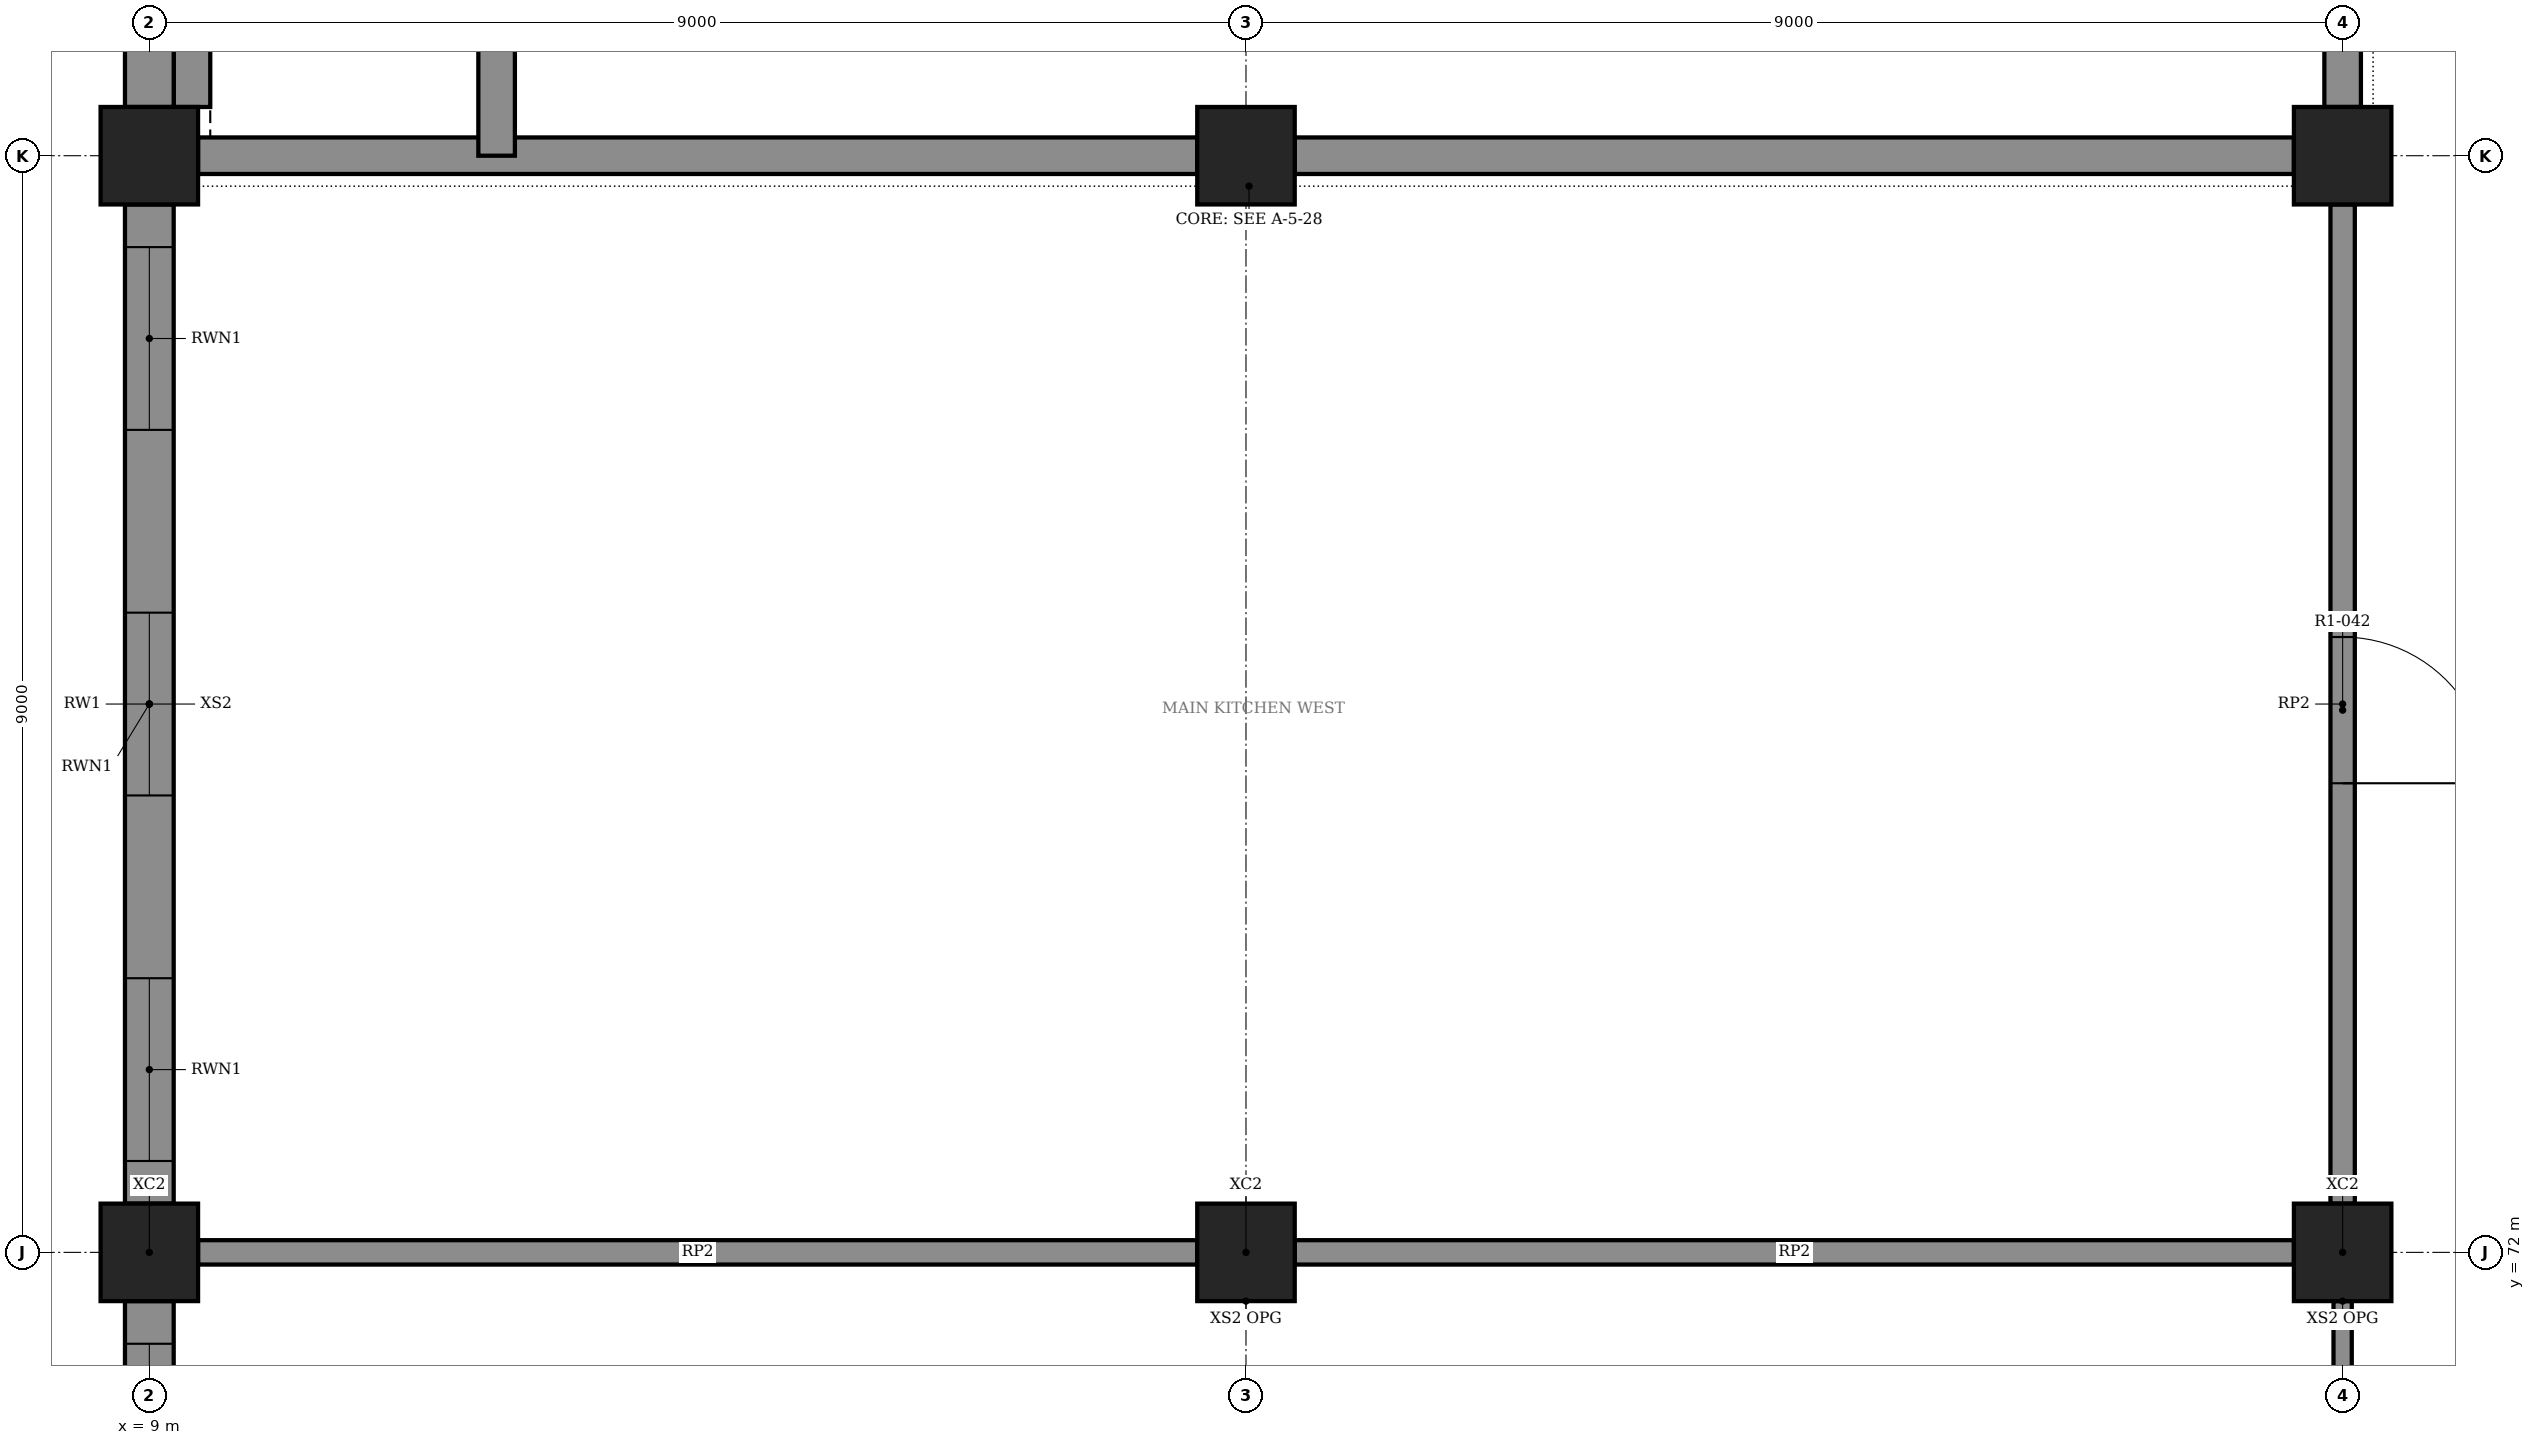
"""IFC4 building model, lengths in metres.
Left out: names, types, materials, properties, quantities, classifications, styles, units other than length and angle.
Written with IfcOpenShell. Run it as: python <this file> out.ifc"""

import sys

from ifc_helpers import new_model, si_unit, direction, frame, frame_2d, origin, origin_2d, place, context, subcontext, project, spatial, rectangle, extrude, element, fill, save


model = new_model("IFC4")
c1 = context("Model", 3, precision=1e-05, world=origin(), true_north=direction((0.0, 1.0)))
c2 = subcontext(c1, "Body", "Model", "MODEL_VIEW")
j1 = project(units=[si_unit("LENGTHUNIT", "METRE"), si_unit("PLANEANGLEUNIT", "RADIAN")], contexts=[c1])
p1 = place(None, origin())
s1 = spatial("IfcSite", under=j1, at=p1, CompositionType="ELEMENT")
p2 = place(p1, origin())
s2 = spatial("IfcBuilding", under=s1, at=p2, CompositionType="ELEMENT")
p3 = place(p2, frame((0.0, 0.0, 6.0)))
s3 = spatial("IfcBuildingStorey", under=s2, at=p3, CompositionType="ELEMENT", Elevation=6.0)
for number, where, z_axis, x_axis in (
    (1, (9.0, 72.0, 0.0), (0.0, 0.0, 1.0), (1.0, 0.0, 0.0)),
    (2, (9.0, 81.0, 0.0), (0.0, 0.0, 1.0), (1.0, 0.0, 0.0)),
    (3, (18.0, 72.0, 0.0), (0.0, 0.0, 1.0), (1.0, 0.0, 0.0)),
    (4, (18.0, 81.0, 0.0), (0.0, 0.0, 1.0), (1.0, 0.0, 0.0)),
    (5, (27.0, 72.0, 0.0), (0.0, 0.0, 1.0), (1.0, 0.0, 0.0)),
    (6, (27.0, 81.0, 0.0), (0.0, 0.0, 1.0), (1.0, 0.0, 0.0)),
):
    element("IfcColumn", number, at=place(p3, frame(where, z_axis=z_axis, x_axis=x_axis)), inside=s3, PredefinedType="COLUMN", context=c2, shape_type="SweptSolid", body=[
        extrude(rectangle(XDim=0.8, YDim=0.8, at=origin_2d()), origin(), (0.0, 0.0, 1.0), 5.5),
    ])
p4 = place(p3, frame((9.0, 63.4, 0.0), z_axis=(0.0, 0.0, 1.0), x_axis=(0.0, 1.0, 0.0)))
e7 = element("IfcWall", 7, at=p4, inside=s3, PredefinedType="SOLIDWALL", context=c2, shape_type="SweptSolid", body=[
    extrude(rectangle(XDim=8.2, YDim=0.4, at=frame_2d((4.1, 0.0))), origin(), (0.0, 0.0, 1.0), 4.32),
])
p5 = place(p4, frame((0.35, 0.0, 0.9)))
e8 = element("IfcOpeningElement", 8, at=p5, cuts=e7, PredefinedType="OPENING", context=c2, shape_type="SweptSolid", body=[
    extrude(rectangle(XDim=1.5, YDim=2.1, at=frame_2d((0.75, 1.05))), frame((0.0, 0.21, 0.0), z_axis=(0.0, -1.0, 0.0), x_axis=(1.0, 0.0, 0.0)), (0.0, 0.0, 1.0), 0.42),
])
p6 = place(p4, frame((3.35, 0.0, 0.9)))
e9 = element("IfcOpeningElement", 9, at=p6, cuts=e7, PredefinedType="OPENING", context=c2, shape_type="SweptSolid", body=[
    extrude(rectangle(XDim=1.5, YDim=2.1, at=frame_2d((0.75, 1.05))), frame((0.0, 0.21, 0.0), z_axis=(0.0, -1.0, 0.0), x_axis=(1.0, 0.0, 0.0)), (0.0, 0.0, 1.0), 0.42),
])
p7 = place(p4, frame((6.35, 0.0, 0.9)))
e10 = element("IfcOpeningElement", 10, at=p7, cuts=e7, PredefinedType="OPENING", context=c2, shape_type="SweptSolid", body=[
    extrude(rectangle(XDim=1.5, YDim=2.1, at=frame_2d((0.75, 1.05))), frame((0.0, 0.21, 0.0), z_axis=(0.0, -1.0, 0.0), x_axis=(1.0, 0.0, 0.0)), (0.0, 0.0, 1.0), 0.42),
])
p8 = place(p3, frame((9.0, 72.4, 0.0), z_axis=(0.0, 0.0, 1.0), x_axis=(0.0, 1.0, 0.0)))
e11 = element("IfcWall", 11, at=p8, inside=s3, PredefinedType="SOLIDWALL", context=c2, shape_type="SweptSolid", body=[
    extrude(rectangle(XDim=8.2, YDim=0.4, at=frame_2d((4.1, 0.0))), origin(), (0.0, 0.0, 1.0), 4.32),
])
p9 = place(p8, frame((0.35, 0.0, 0.9)))
e12 = element("IfcOpeningElement", 12, at=p9, cuts=e11, PredefinedType="OPENING", context=c2, shape_type="SweptSolid", body=[
    extrude(rectangle(XDim=1.5, YDim=2.1, at=frame_2d((0.75, 1.05))), frame((0.0, 0.21, 0.0), z_axis=(0.0, -1.0, 0.0), x_axis=(1.0, 0.0, 0.0)), (0.0, 0.0, 1.0), 0.42),
])
p10 = place(p8, frame((3.35, 0.0, 0.9)))
e13 = element("IfcOpeningElement", 13, at=p10, cuts=e11, PredefinedType="OPENING", context=c2, shape_type="SweptSolid", body=[
    extrude(rectangle(XDim=1.5, YDim=2.1, at=frame_2d((0.75, 1.05))), frame((0.0, 0.21, 0.0), z_axis=(0.0, -1.0, 0.0), x_axis=(1.0, 0.0, 0.0)), (0.0, 0.0, 1.0), 0.42),
])
p11 = place(p8, frame((6.35, 0.0, 0.9)))
e14 = element("IfcOpeningElement", 14, at=p11, cuts=e11, PredefinedType="OPENING", context=c2, shape_type="SweptSolid", body=[
    extrude(rectangle(XDim=1.5, YDim=2.1, at=frame_2d((0.75, 1.05))), frame((0.0, 0.21, 0.0), z_axis=(0.0, -1.0, 0.0), x_axis=(1.0, 0.0, 0.0)), (0.0, 0.0, 1.0), 0.42),
])
p12 = place(p3, frame((9.0, 81.4, 0.0), z_axis=(0.0, 0.0, 1.0), x_axis=(0.0, 1.0, 0.0)))
e15 = element("IfcWall", 15, at=p12, inside=s3, PredefinedType="SOLIDWALL", context=c2, shape_type="SweptSolid", body=[
    extrude(rectangle(XDim=8.2, YDim=0.4, at=frame_2d((4.1, 0.0))), origin(), (0.0, 0.0, 1.0), 4.32),
])
p13 = place(p12, frame((5.15, 0.0, 1.2)))
e16 = element("IfcOpeningElement", 16, at=p13, cuts=e15, PredefinedType="OPENING", context=c2, shape_type="SweptSolid", body=[
    extrude(rectangle(XDim=1.5, YDim=1.8, at=frame_2d((0.75, 0.9))), frame((0.0, 0.21, 0.0), z_axis=(0.0, -1.0, 0.0), x_axis=(1.0, 0.0, 0.0)), (0.0, 0.0, 1.0), 0.42),
])
for number, where, z_axis, x_axis in (
    (17, (9.4, 81.0, 0.0), (0.0, 0.0, 1.0), (1.0, 0.0, 0.0)),
    (18, (18.4, 81.0, 0.0), (0.0, 0.0, 1.0), (1.0, 0.0, 0.0)),
):
    element("IfcWall", number, at=place(p3, frame(where, z_axis=z_axis, x_axis=x_axis)), inside=s3, PredefinedType="SOLIDWALL", context=c2, shape_type="SweptSolid", body=[
        extrude(rectangle(XDim=8.2, YDim=0.3, at=frame_2d((4.1, 0.0))), origin(), (0.0, 0.0, 1.0), 4.32),
    ])
p14 = place(p3, frame((27.0, 89.6, 0.0), z_axis=(0.0, 0.0, 1.0), x_axis=(0.0, -1.0, 0.0)))
e19 = element("IfcWall", 19, at=p14, inside=s3, PredefinedType="SOLIDWALL", context=c2, shape_type="SweptSolid", body=[
    extrude(rectangle(XDim=8.2, YDim=0.3, at=frame_2d((4.1, 0.0))), origin(), (0.0, 0.0, 1.0), 4.32),
])
p15 = place(p14, frame((2.65, 0.0, 0.0)))
e20 = element("IfcOpeningElement", 20, at=p15, cuts=e19, PredefinedType="OPENING", context=c2, shape_type="SweptSolid", body=[
    extrude(rectangle(XDim=1.8, YDim=2.4, at=frame_2d((0.9, 1.2))), frame((0.0, 0.16, 0.0), z_axis=(0.0, -1.0, 0.0), x_axis=(1.0, 0.0, 0.0)), (0.0, 0.0, 1.0), 0.32),
])
p16 = place(p3, frame((11.85, 83.7, 0.0), z_axis=(0.0, 0.0, 1.0), x_axis=(0.0, -1.0, 0.0)))
e21 = element("IfcWall", 21, at=p16, inside=s3, PredefinedType="SOLIDWALL", context=c2, shape_type="SweptSolid", body=[
    extrude(rectangle(XDim=2.7, YDim=0.3, at=frame_2d((1.35, 0.0))), origin(), (0.0, 0.0, 1.0), 5.22),
])
p17 = place(p3, frame((9.35, 83.7, 0.0), z_axis=(0.0, 0.0, 1.0), x_axis=(0.0, -1.0, 0.0)))
e22 = element("IfcWall", 22, at=p17, inside=s3, PredefinedType="SOLIDWALL", context=c2, shape_type="SweptSolid", body=[
    extrude(rectangle(XDim=2.3, YDim=0.3, at=frame_2d((1.15, 0.0))), origin(), (0.0, 0.0, 1.0), 4.32),
])
for number, where, z_axis, x_axis in (
    (23, (9.4, 72.0, 0.0), (0.0, 0.0, 1.0), (1.0, 0.0, 0.0)),
    (24, (18.4, 72.0, 0.0), (0.0, 0.0, 1.0), (1.0, 0.0, 0.0)),
):
    element("IfcWall", number, at=place(p3, frame(where, z_axis=z_axis, x_axis=x_axis)), inside=s3, PredefinedType="PARTITIONING", context=c2, shape_type="SweptSolid", body=[
        extrude(rectangle(XDim=8.2, YDim=0.2, at=frame_2d((4.1, 0.0))), origin(), (0.0, 0.0, 1.0), 4.32),
    ])
p18 = place(p3, frame((27.0, 63.4, 0.0), z_axis=(0.0, 0.0, 1.0), x_axis=(0.0, 1.0, 0.0)))
e25 = element("IfcWall", 25, at=p18, inside=s3, PredefinedType="PARTITIONING", context=c2, shape_type="SweptSolid", body=[
    extrude(rectangle(XDim=8.2, YDim=0.15, at=frame_2d((4.1, 0.0))), origin(), (0.0, 0.0, 1.0), 4.32),
])
p19 = place(p18, frame((3.45, 0.0, 0.0)))
e26 = element("IfcOpeningElement", 26, at=p19, cuts=e25, PredefinedType="OPENING", context=c2, shape_type="SweptSolid", body=[
    extrude(rectangle(XDim=1.2, YDim=2.4, at=frame_2d((0.6, 1.2))), frame((0.0, 0.085, 0.0), z_axis=(0.0, -1.0, 0.0), x_axis=(1.0, 0.0, 0.0)), (0.0, 0.0, 1.0), 0.17),
])
p20 = place(p3, frame((27.0, 72.4, 0.0), z_axis=(0.0, 0.0, 1.0), x_axis=(0.0, 1.0, 0.0)))
e27 = element("IfcWall", 27, at=p20, inside=s3, PredefinedType="PARTITIONING", context=c2, shape_type="SweptSolid", body=[
    extrude(rectangle(XDim=8.2, YDim=0.2, at=frame_2d((4.1, 0.0))), origin(), (0.0, 0.0, 1.0), 4.32),
])
p21 = place(p20, frame((3.45, 0.0, 0.0)))
e28 = element("IfcOpeningElement", 28, at=p21, cuts=e27, PredefinedType="OPENING", context=c2, shape_type="SweptSolid", body=[
    extrude(rectangle(XDim=1.2, YDim=2.4, at=frame_2d((0.6, 1.2))), frame((0.0, 0.11, 0.0), z_axis=(0.0, -1.0, 0.0), x_axis=(1.0, 0.0, 0.0)), (0.0, 0.0, 1.0), 0.22),
])
p22 = place(p7, origin())
e29 = element("IfcWindow", 29, at=p22, inside=s3, PartitioningType="SINGLE_PANEL", PredefinedType="WINDOW", context=c2, shape_type="SweptSolid", body=[
    extrude(rectangle(XDim=1.5, YDim=2.1, at=frame_2d((0.75, 1.05))), frame((0.0, 0.03, 0.0), z_axis=(0.0, -1.0, 0.0), x_axis=(1.0, 0.0, 0.0)), (0.0, 0.0, 1.0), 0.06),
])
fill(e10, e29)
p23 = place(p9, origin())
e30 = element("IfcWindow", 30, at=p23, inside=s3, PartitioningType="SINGLE_PANEL", PredefinedType="WINDOW", context=c2, shape_type="SweptSolid", body=[
    extrude(rectangle(XDim=1.5, YDim=2.1, at=frame_2d((0.75, 1.05))), frame((0.0, 0.03, 0.0), z_axis=(0.0, -1.0, 0.0), x_axis=(1.0, 0.0, 0.0)), (0.0, 0.0, 1.0), 0.06),
])
fill(e12, e30)
p24 = place(p10, origin())
e31 = element("IfcWindow", 31, at=p24, inside=s3, PartitioningType="SINGLE_PANEL", PredefinedType="WINDOW", context=c2, shape_type="SweptSolid", body=[
    extrude(rectangle(XDim=1.5, YDim=2.1, at=frame_2d((0.75, 1.05))), frame((0.0, 0.03, 0.0), z_axis=(0.0, -1.0, 0.0), x_axis=(1.0, 0.0, 0.0)), (0.0, 0.0, 1.0), 0.06),
])
fill(e13, e31)
p25 = place(p11, origin())
e32 = element("IfcWindow", 32, at=p25, inside=s3, PartitioningType="SINGLE_PANEL", PredefinedType="WINDOW", context=c2, shape_type="SweptSolid", body=[
    extrude(rectangle(XDim=1.5, YDim=2.1, at=frame_2d((0.75, 1.05))), frame((0.0, 0.03, 0.0), z_axis=(0.0, -1.0, 0.0), x_axis=(1.0, 0.0, 0.0)), (0.0, 0.0, 1.0), 0.06),
])
fill(e14, e32)
p26 = place(p21, frame((1.2, 0.0, 0.0), z_axis=(0.0, 0.0, 1.0), x_axis=(-1.0, 0.0, 0.0)))
e33 = element("IfcDoor", 33, at=p26, inside=s3, OperationType="SINGLE_SWING_LEFT", PredefinedType="DOOR", context=c2, shape_type="SweptSolid", body=[
    extrude(rectangle(XDim=1.2, YDim=2.4, at=frame_2d((0.6, 1.2))), frame((0.0, 0.025, 0.0), z_axis=(0.0, -1.0, 0.0), x_axis=(1.0, 0.0, 0.0)), (0.0, 0.0, 1.0), 0.05),
])
fill(e28, e33)
save(model, sys.argv[1])
